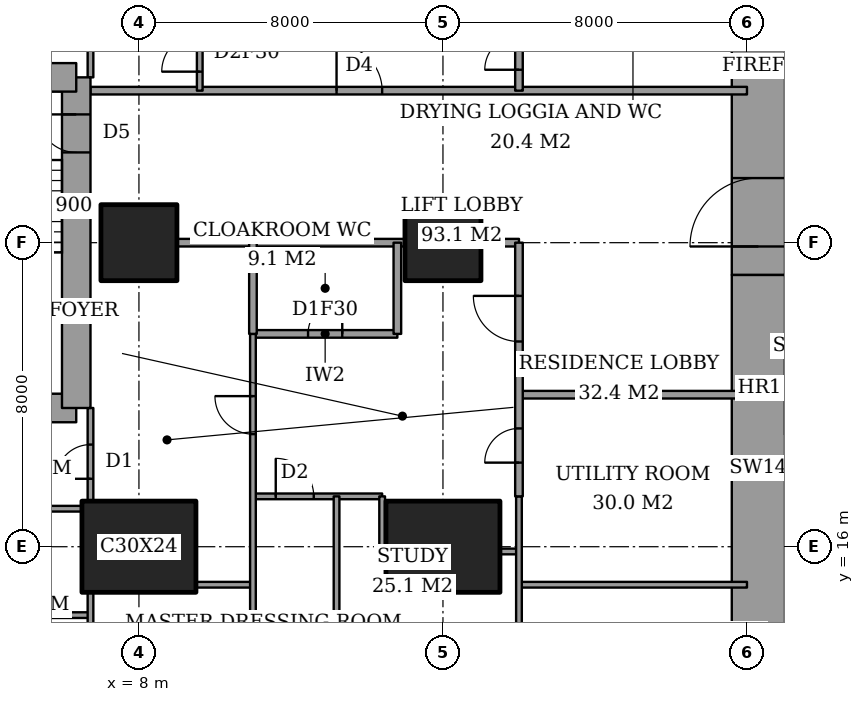
"""IFC4 building model, lengths in metres.
Left out: names, types, materials, properties, quantities, classifications, styles, units other than length and angle.
Written with IfcOpenShell. Run it as: python <this file> out.ifc"""

import sys

from ifc_helpers import new_model, si_unit, direction, frame, frame_2d, origin, origin_2d, place, context, subcontext, project, spatial, rectangle, extrude, element, fill, save


model = new_model("IFC4")
c1 = context("Model", 3, precision=1e-05, world=origin(), true_north=direction((0.0, 1.0)))
c2 = subcontext(c1, "Body", "Model", "MODEL_VIEW")
j1 = project(units=[si_unit("LENGTHUNIT", "METRE"), si_unit("PLANEANGLEUNIT", "RADIAN")], contexts=[c1])
p1 = place(None, origin())
s1 = spatial("IfcSite", under=j1, at=p1, CompositionType="ELEMENT")
p2 = place(p1, origin())
s2 = spatial("IfcBuilding", under=s1, at=p2, CompositionType="ELEMENT")
p3 = place(p2, frame((0.0, 0.0, 150.2)))
s3 = spatial("IfcBuildingStorey", under=s2, at=p3, CompositionType="ELEMENT", Elevation=150.2)
p4 = place(p3, frame((8.0, 16.0, 0.0), z_axis=(0.0, 0.0, 1.0), x_axis=(1.0, 0.0, 0.0)))
e1 = element("IfcColumn", 1, at=p4, inside=s3, PredefinedType="COLUMN", context=c2, shape_type="SweptSolid", body=[
    extrude(rectangle(XDim=3.0, YDim=2.4, at=origin_2d()), origin(), (0.0, 0.0, 1.0), 3.6),
])
p5 = place(p3, frame((8.0, 24.0, 0.0), z_axis=(0.0, 0.0, 1.0), x_axis=(1.0, 0.0, 0.0)))
e2 = element("IfcColumn", 2, at=p5, inside=s3, PredefinedType="COLUMN", context=c2, shape_type="SweptSolid", body=[
    extrude(rectangle(XDim=2.0, YDim=2.0, at=origin_2d()), origin(), (0.0, 0.0, 1.0), 3.6),
])
p6 = place(p3, frame((16.0, 16.0, 0.0), z_axis=(0.0, 0.0, 1.0), x_axis=(1.0, 0.0, 0.0)))
e3 = element("IfcColumn", 3, at=p6, inside=s3, PredefinedType="COLUMN", context=c2, shape_type="SweptSolid", body=[
    extrude(rectangle(XDim=3.0, YDim=2.4, at=origin_2d()), origin(), (0.0, 0.0, 1.0), 3.6),
])
p7 = place(p3, frame((16.0, 24.0, 0.0), z_axis=(0.0, 0.0, 1.0), x_axis=(1.0, 0.0, 0.0)))
e4 = element("IfcColumn", 4, at=p7, inside=s3, PredefinedType="COLUMN", context=c2, shape_type="SweptSolid", body=[
    extrude(rectangle(XDim=2.0, YDim=2.0, at=origin_2d()), origin(), (0.0, 0.0, 1.0), 3.6),
])
p8 = place(p3, frame((24.3, 13.0, 0.0), z_axis=(0.0, 0.0, 1.0), x_axis=(0.0, 1.0, 0.0)))
e5 = element("IfcWall", 5, at=p8, inside=s3, PredefinedType="SHEAR", context=c2, shape_type="SweptSolid", body=[
    extrude(rectangle(XDim=10.15, YDim=1.4, at=frame_2d((5.075, 0.0))), origin(), (0.0, 0.0, 1.0), 3.6),
])
p9 = place(p3, frame((24.3, 23.15, 0.0), z_axis=(0.0, 0.0, 1.0), x_axis=(0.0, 1.0, 0.0)))
e6 = element("IfcWall", 6, at=p9, inside=s3, PredefinedType="SHEAR", context=c2, shape_type="SweptSolid", body=[
    extrude(rectangle(XDim=11.85, YDim=1.4, at=frame_2d((5.925, 0.0))), origin(), (0.0, 0.0, 1.0), 3.6),
])
p10 = place(p9, frame((0.75, 0.0, 0.0)))
e7 = element("IfcOpeningElement", 7, at=p10, cuts=e6, PredefinedType="OPENING", context=c2, shape_type="SweptSolid", body=[
    extrude(rectangle(XDim=1.8, YDim=2.4, at=frame_2d((0.9, 1.2))), frame((0.0, 0.71, 0.0), z_axis=(0.0, -1.0, 0.0), x_axis=(1.0, 0.0, 0.0)), (0.0, 0.0, 1.0), 1.42),
])
p11 = place(p3, frame((1.9, 19.65, 0.0), z_axis=(0.0, 0.0, 1.0), x_axis=(1.0, 0.0, 0.0)))
e8 = element("IfcWall", 8, at=p11, inside=s3, PredefinedType="SHEAR", context=c2, shape_type="SweptSolid", body=[
    extrude(rectangle(XDim=4.45, YDim=0.75, at=frame_2d((2.225, 0.0))), origin(), (0.0, 0.0, 1.0), 3.6),
])
p12 = place(p3, frame((6.35, 19.65, 0.0), z_axis=(0.0, 0.0, 1.0), x_axis=(0.0, 1.0, 0.0)))
e9 = element("IfcWall", 9, at=p12, inside=s3, PredefinedType="SHEAR", context=c2, shape_type="SweptSolid", body=[
    extrude(rectangle(XDim=8.7, YDim=0.75, at=frame_2d((4.35, 0.0))), origin(), (0.0, 0.0, 1.0), 3.6),
])
p13 = place(p12, frame((6.725, 0.0, 0.0)))
e10 = element("IfcOpeningElement", 10, at=p13, cuts=e9, PredefinedType="OPENING", context=c2, shape_type="SweptSolid", body=[
    extrude(rectangle(XDim=1.0, YDim=2.1, at=frame_2d((0.5, 1.05))), frame((0.0, 0.385, 0.0), z_axis=(0.0, -1.0, 0.0), x_axis=(1.0, 0.0, 0.0)), (0.0, 0.0, 1.0), 0.77),
])
p14 = place(p3, frame((6.35, 28.35, 0.0), z_axis=(0.0, 0.0, 1.0), x_axis=(-1.0, 0.0, 0.0)))
e11 = element("IfcWall", 11, at=p14, inside=s3, PredefinedType="SHEAR", context=c2, shape_type="SweptSolid", body=[
    extrude(rectangle(XDim=4.45, YDim=0.75, at=frame_2d((2.225, 0.0))), origin(), (0.0, 0.0, 1.0), 3.6),
])
p15 = place(p3, frame((4.125, 14.2, 0.0), z_axis=(0.0, 0.0, 1.0), x_axis=(1.0, 0.0, 0.0)))
e12 = element("IfcWall", 12, at=p15, inside=s3, PredefinedType="PARTITIONING", context=c2, shape_type="SweptSolid", body=[
    extrude(rectangle(XDim=2.6, YDim=0.15, at=frame_2d((1.3, 0.0))), origin(), (0.0, 0.0, 1.0), 3.35),
])
p16 = place(p3, frame((9.5, 15.0, 0.0), z_axis=(0.0, 0.0, 1.0), x_axis=(1.0, 0.0, 0.0)))
e13 = element("IfcWall", 13, at=p16, inside=s3, PredefinedType="PARTITIONING", context=c2, shape_type="SweptSolid", body=[
    extrude(rectangle(XDim=1.5, YDim=0.15, at=frame_2d((0.75, 0.0))), origin(), (0.0, 0.0, 1.0), 3.35),
])
p17 = place(p3, frame((18.0, 15.0, 0.0), z_axis=(0.0, 0.0, 1.0), x_axis=(1.0, 0.0, 0.0)))
e14 = element("IfcWall", 14, at=p17, inside=s3, PredefinedType="PARTITIONING", context=c2, shape_type="SweptSolid", body=[
    extrude(rectangle(XDim=6.0, YDim=0.15, at=frame_2d((3.0, 0.0))), origin(), (0.0, 0.0, 1.0), 3.35),
])
p18 = place(p3, frame((17.5, 15.875, 0.0), z_axis=(0.0, 0.0, 1.0), x_axis=(1.0, 0.0, 0.0)))
e15 = element("IfcWall", 15, at=p18, inside=s3, PredefinedType="PARTITIONING", context=c2, shape_type="SweptSolid", body=[
    extrude(rectangle(XDim=0.5, YDim=0.15, at=frame_2d((0.25, 0.0))), origin(), (0.0, 0.0, 1.0), 2.634),
])
p19 = place(p3, frame((1.35, 17.0, 0.0), z_axis=(0.0, 0.0, 1.0), x_axis=(1.0, 0.0, 0.0)))
e16 = element("IfcWall", 16, at=p19, inside=s3, PredefinedType="PARTITIONING", context=c2, shape_type="SweptSolid", body=[
    extrude(rectangle(XDim=5.15, YDim=0.15, at=frame_2d((2.575, 0.0))), origin(), (0.0, 0.0, 1.0), 3.35),
])
p20 = place(p3, frame((11.0, 17.325, 0.0), z_axis=(0.0, 0.0, 1.0), x_axis=(1.0, 0.0, 0.0)))
e17 = element("IfcWall", 17, at=p20, inside=s3, PredefinedType="PARTITIONING", context=c2, shape_type="SweptSolid", body=[
    extrude(rectangle(XDim=3.4, YDim=0.15, at=frame_2d((1.7, 0.0))), origin(), (0.0, 0.0, 1.0), 3.35),
])
p21 = place(p20, frame((0.6, 0.0, 0.0)))
e18 = element("IfcOpeningElement", 18, at=p21, cuts=e17, PredefinedType="OPENING", context=c2, shape_type="SweptSolid", body=[
    extrude(rectangle(XDim=1.0, YDim=2.1, at=frame_2d((0.5, 1.05))), frame((0.0, 0.085, 0.0), z_axis=(0.0, -1.0, 0.0), x_axis=(1.0, 0.0, 0.0)), (0.0, 0.0, 1.0), 0.17),
])
p22 = place(p3, frame((18.0, 20.0, 0.0), z_axis=(0.0, 0.0, 1.0), x_axis=(1.0, 0.0, 0.0)))
e19 = element("IfcWall", 19, at=p22, inside=s3, PredefinedType="PARTITIONING", context=c2, shape_type="SweptSolid", body=[
    extrude(rectangle(XDim=6.0, YDim=0.2, at=frame_2d((3.0, 0.0))), origin(), (0.0, 0.0, 1.0), 3.35),
])
p23 = place(p3, frame((11.0, 21.6, 0.0), z_axis=(0.0, 0.0, 1.0), x_axis=(1.0, 0.0, 0.0)))
e20 = element("IfcWall", 20, at=p23, inside=s3, PredefinedType="PARTITIONING", context=c2, shape_type="SweptSolid", body=[
    extrude(rectangle(XDim=3.8, YDim=0.2, at=frame_2d((1.9, 0.0))), origin(), (0.0, 0.0, 1.0), 3.35),
])
p24 = place(p23, frame((1.45, 0.0, 0.0)))
e21 = element("IfcOpeningElement", 21, at=p24, cuts=e20, PredefinedType="OPENING", context=c2, shape_type="SweptSolid", body=[
    extrude(rectangle(XDim=0.9, YDim=2.1, at=frame_2d((0.45, 1.05))), frame((0.0, 0.11, 0.0), z_axis=(0.0, -1.0, 0.0), x_axis=(1.0, 0.0, 0.0)), (0.0, 0.0, 1.0), 0.22),
])
p25 = place(p3, frame((9.0, 24.0, 0.0), z_axis=(0.0, 0.0, 1.0), x_axis=(1.0, 0.0, 0.0)))
e22 = element("IfcWall", 22, at=p25, inside=s3, PredefinedType="PARTITIONING", context=c2, shape_type="SweptSolid", body=[
    extrude(rectangle(XDim=6.0, YDim=0.2, at=frame_2d((3.0, 0.0))), origin(), (0.0, 0.0, 1.0), 3.35),
])
p26 = place(p3, frame((17.0, 24.0, 0.0), z_axis=(0.0, 0.0, 1.0), x_axis=(1.0, 0.0, 0.0)))
e23 = element("IfcWall", 23, at=p26, inside=s3, PredefinedType="PARTITIONING", context=c2, shape_type="SweptSolid", body=[
    extrude(rectangle(XDim=1.0, YDim=0.2, at=frame_2d((0.5, 0.0))), origin(), (0.0, 0.0, 1.0), 3.35),
])
p27 = place(p3, frame((6.725, 28.0, 0.0), z_axis=(0.0, 0.0, 1.0), x_axis=(1.0, 0.0, 0.0)))
e24 = element("IfcWall", 24, at=p27, inside=s3, PredefinedType="PARTITIONING", context=c2, shape_type="SweptSolid", body=[
    extrude(rectangle(XDim=17.275, YDim=0.2, at=frame_2d((8.637, 0.0))), origin(), (0.0, 0.0, 1.0), 3.35),
])
p28 = place(p27, frame((6.475, 0.0, 0.0)))
e25 = element("IfcOpeningElement", 25, at=p28, cuts=e24, PredefinedType="OPENING", context=c2, shape_type="SweptSolid", body=[
    extrude(rectangle(XDim=1.2, YDim=2.4, at=frame_2d((0.6, 1.2))), frame((0.0, 0.11, 0.0), z_axis=(0.0, -1.0, 0.0), x_axis=(1.0, 0.0, 0.0)), (0.0, 0.0, 1.0), 0.22),
])
p29 = place(p3, frame((6.725, 11.0, 0.0), z_axis=(0.0, 0.0, 1.0), x_axis=(0.0, 1.0, 0.0)))
e26 = element("IfcWall", 26, at=p29, inside=s3, PredefinedType="PARTITIONING", context=c2, shape_type="SweptSolid", body=[
    extrude(rectangle(XDim=3.8, YDim=0.15, at=frame_2d((1.9, 0.0))), origin(), (0.0, 0.0, 1.0), 3.35),
])
p30 = place(p29, frame((1.15, 0.0, 0.0)))
e27 = element("IfcOpeningElement", 27, at=p30, cuts=e26, PredefinedType="OPENING", context=c2, shape_type="SweptSolid", body=[
    extrude(rectangle(XDim=0.9, YDim=2.1, at=frame_2d((0.45, 1.05))), frame((0.0, 0.085, 0.0), z_axis=(0.0, -1.0, 0.0), x_axis=(1.0, 0.0, 0.0)), (0.0, 0.0, 1.0), 0.17),
])
p31 = place(p3, frame((6.725, 17.2, 0.0), z_axis=(0.0, 0.0, 1.0), x_axis=(0.0, 1.0, 0.0)))
e28 = element("IfcWall", 28, at=p31, inside=s3, PredefinedType="PARTITIONING", context=c2, shape_type="SweptSolid", body=[
    extrude(rectangle(XDim=2.45, YDim=0.15, at=frame_2d((1.225, 0.0))), origin(), (0.0, 0.0, 1.0), 3.35),
])
p32 = place(p31, frame((0.587, 0.0, 0.0)))
e29 = element("IfcOpeningElement", 29, at=p32, cuts=e28, PredefinedType="OPENING", context=c2, shape_type="SweptSolid", body=[
    extrude(rectangle(XDim=0.9, YDim=2.1, at=frame_2d((0.45, 1.05))), frame((0.0, 0.085, 0.0), z_axis=(0.0, -1.0, 0.0), x_axis=(1.0, 0.0, 0.0)), (0.0, 0.0, 1.0), 0.17),
])
p33 = place(p3, frame((6.725, 28.35, 0.0), z_axis=(0.0, 0.0, 1.0), x_axis=(0.0, 1.0, 0.0)))
e30 = element("IfcWall", 30, at=p33, inside=s3, PredefinedType="PARTITIONING", context=c2, shape_type="SweptSolid", body=[
    extrude(rectangle(XDim=2.45, YDim=0.15, at=frame_2d((1.225, 0.0))), origin(), (0.0, 0.0, 1.0), 3.35),
])
p34 = place(p33, frame((0.913, 0.0, 0.0)))
e31 = element("IfcOpeningElement", 31, at=p34, cuts=e30, PredefinedType="OPENING", context=c2, shape_type="SweptSolid", body=[
    extrude(rectangle(XDim=1.0, YDim=2.1, at=frame_2d((0.5, 1.05))), frame((0.0, 0.085, 0.0), z_axis=(0.0, -1.0, 0.0), x_axis=(1.0, 0.0, 0.0)), (0.0, 0.0, 1.0), 0.17),
])
p35 = place(p3, frame((9.6, 28.0, 0.0), z_axis=(0.0, 0.0, 1.0), x_axis=(0.0, 1.0, 0.0)))
e32 = element("IfcWall", 32, at=p35, inside=s3, PredefinedType="PARTITIONING", context=c2, shape_type="SweptSolid", body=[
    extrude(rectangle(XDim=9.4, YDim=0.15, at=frame_2d((4.7, 0.0))), origin(), (0.0, 0.0, 1.0), 3.35),
])
p36 = place(p35, frame((0.5, 0.0, 0.0)))
e33 = element("IfcOpeningElement", 33, at=p36, cuts=e32, PredefinedType="OPENING", context=c2, shape_type="SweptSolid", body=[
    extrude(rectangle(XDim=1.0, YDim=2.1, at=frame_2d((0.5, 1.05))), frame((0.0, 0.085, 0.0), z_axis=(0.0, -1.0, 0.0), x_axis=(1.0, 0.0, 0.0)), (0.0, 0.0, 1.0), 0.17),
])
p37 = place(p3, frame((11.0, 21.6, 0.0), z_axis=(0.0, 0.0, 1.0), x_axis=(0.0, 1.0, 0.0)))
e34 = element("IfcWall", 34, at=p37, inside=s3, PredefinedType="PARTITIONING", context=c2, shape_type="SweptSolid", body=[
    extrude(rectangle(XDim=2.4, YDim=0.2, at=frame_2d((1.2, 0.0))), origin(), (0.0, 0.0, 1.0), 3.35),
])
p38 = place(p3, frame((11.0, 11.0, 0.0), z_axis=(0.0, 0.0, 1.0), x_axis=(0.0, 1.0, 0.0)))
e35 = element("IfcWall", 35, at=p38, inside=s3, PredefinedType="PARTITIONING", context=c2, shape_type="SweptSolid", body=[
    extrude(rectangle(XDim=10.6, YDim=0.15, at=frame_2d((5.3, 0.0))), origin(), (0.0, 0.0, 1.0), 3.35),
])
p39 = place(p38, frame((7.962, 0.0, 0.0)))
e36 = element("IfcOpeningElement", 36, at=p39, cuts=e35, PredefinedType="OPENING", context=c2, shape_type="SweptSolid", body=[
    extrude(rectangle(XDim=1.0, YDim=2.1, at=frame_2d((0.5, 1.05))), frame((0.0, 0.085, 0.0), z_axis=(0.0, -1.0, 0.0), x_axis=(1.0, 0.0, 0.0)), (0.0, 0.0, 1.0), 0.17),
])
p40 = place(p3, frame((13.2, 11.0, 0.0), z_axis=(0.0, 0.0, 1.0), x_axis=(0.0, 1.0, 0.0)))
e37 = element("IfcWall", 37, at=p40, inside=s3, PredefinedType="PARTITIONING", context=c2, shape_type="SweptSolid", body=[
    extrude(rectangle(XDim=6.325, YDim=0.15, at=frame_2d((3.163, 0.0))), origin(), (0.0, 0.0, 1.0), 3.35),
])
p41 = place(p3, frame((14.4, 15.875, 0.0), z_axis=(0.0, 0.0, 1.0), x_axis=(0.0, 1.0, 0.0)))
e38 = element("IfcWall", 38, at=p41, inside=s3, PredefinedType="PARTITIONING", context=c2, shape_type="SweptSolid", body=[
    extrude(rectangle(XDim=1.45, YDim=0.15, at=frame_2d((0.725, 0.0))), origin(), (0.0, 0.0, 1.0), 3.35),
])
p42 = place(p3, frame((14.8, 21.6, 0.0), z_axis=(0.0, 0.0, 1.0), x_axis=(0.0, 1.0, 0.0)))
e39 = element("IfcWall", 39, at=p42, inside=s3, PredefinedType="PARTITIONING", context=c2, shape_type="SweptSolid", body=[
    extrude(rectangle(XDim=2.4, YDim=0.2, at=frame_2d((1.2, 0.0))), origin(), (0.0, 0.0, 1.0), 3.35),
])
p43 = place(p3, frame((18.0, 17.325, 0.0), z_axis=(0.0, 0.0, 1.0), x_axis=(0.0, 1.0, 0.0)))
e40 = element("IfcWall", 40, at=p43, inside=s3, PredefinedType="PARTITIONING", context=c2, shape_type="SweptSolid", body=[
    extrude(rectangle(XDim=6.675, YDim=0.2, at=frame_2d((3.337, 0.0))), origin(), (0.0, 0.0, 1.0), 3.35),
])
p44 = place(p43, frame((4.075, 0.0, 0.0)))
e41 = element("IfcOpeningElement", 41, at=p44, cuts=e40, PredefinedType="OPENING", context=c2, shape_type="SweptSolid", body=[
    extrude(rectangle(XDim=1.2, YDim=2.4, at=frame_2d((0.6, 1.2))), frame((0.0, 0.11, 0.0), z_axis=(0.0, -1.0, 0.0), x_axis=(1.0, 0.0, 0.0)), (0.0, 0.0, 1.0), 0.22),
])
p45 = place(p43, frame((0.887, 0.0, 0.0)))
e42 = element("IfcOpeningElement", 42, at=p45, cuts=e40, PredefinedType="OPENING", context=c2, shape_type="SweptSolid", body=[
    extrude(rectangle(XDim=0.9, YDim=2.1, at=frame_2d((0.45, 1.05))), frame((0.0, 0.11, 0.0), z_axis=(0.0, -1.0, 0.0), x_axis=(1.0, 0.0, 0.0)), (0.0, 0.0, 1.0), 0.22),
])
p46 = place(p3, frame((18.0, 28.0, 0.0), z_axis=(0.0, 0.0, 1.0), x_axis=(0.0, 1.0, 0.0)))
e43 = element("IfcWall", 43, at=p46, inside=s3, PredefinedType="PARTITIONING", context=c2, shape_type="SweptSolid", body=[
    extrude(rectangle(XDim=3.4, YDim=0.2, at=frame_2d((1.7, 0.0))), origin(), (0.0, 0.0, 1.0), 3.35),
])
p47 = place(p46, frame((0.55, 0.0, 0.0)))
e44 = element("IfcOpeningElement", 44, at=p47, cuts=e43, PredefinedType="OPENING", context=c2, shape_type="SweptSolid", body=[
    extrude(rectangle(XDim=0.9, YDim=2.1, at=frame_2d((0.45, 1.05))), frame((0.0, 0.11, 0.0), z_axis=(0.0, -1.0, 0.0), x_axis=(1.0, 0.0, 0.0)), (0.0, 0.0, 1.0), 0.22),
])
p48 = place(p3, frame((18.0, 11.0, 0.0), z_axis=(0.0, 0.0, 1.0), x_axis=(0.0, 1.0, 0.0)))
e45 = element("IfcWall", 45, at=p48, inside=s3, PredefinedType="PARTITIONING", context=c2, shape_type="SweptSolid", body=[
    extrude(rectangle(XDim=6.325, YDim=0.15, at=frame_2d((3.163, 0.0))), origin(), (0.0, 0.0, 1.0), 3.35),
])
p49 = place(p32, origin())
e46 = element("IfcDoor", 46, at=p49, inside=s3, OperationType="SINGLE_SWING_RIGHT", PredefinedType="DOOR", context=c2, shape_type="SweptSolid", body=[
    extrude(rectangle(XDim=0.9, YDim=2.1, at=frame_2d((0.45, 1.05))), frame((0.0, 0.025, 0.0), z_axis=(0.0, -1.0, 0.0), x_axis=(1.0, 0.0, 0.0)), (0.0, 0.0, 1.0), 0.05),
])
fill(e29, e46)
p50 = place(p39, origin())
e47 = element("IfcDoor", 47, at=p50, inside=s3, OperationType="SINGLE_SWING_LEFT", PredefinedType="DOOR", context=c2, shape_type="SweptSolid", body=[
    extrude(rectangle(XDim=1.0, YDim=2.1, at=frame_2d((0.5, 1.05))), frame((0.0, 0.025, 0.0), z_axis=(0.0, -1.0, 0.0), x_axis=(1.0, 0.0, 0.0)), (0.0, 0.0, 1.0), 0.05),
])
fill(e36, e47)
p51 = place(p24, origin())
e48 = element("IfcDoor", 48, at=p51, inside=s3, OperationType="SINGLE_SWING_LEFT", PredefinedType="DOOR", context=c2, shape_type="SweptSolid", body=[
    extrude(rectangle(XDim=0.9, YDim=2.1, at=frame_2d((0.45, 1.05))), frame((0.0, 0.025, 0.0), z_axis=(0.0, -1.0, 0.0), x_axis=(1.0, 0.0, 0.0)), (0.0, 0.0, 1.0), 0.05),
])
fill(e21, e48)
p52 = place(p44, origin())
e49 = element("IfcDoor", 49, at=p52, inside=s3, OperationType="SINGLE_SWING_LEFT", PredefinedType="DOOR", context=c2, shape_type="SweptSolid", body=[
    extrude(rectangle(XDim=1.2, YDim=2.4, at=frame_2d((0.6, 1.2))), frame((0.0, 0.025, 0.0), z_axis=(0.0, -1.0, 0.0), x_axis=(1.0, 0.0, 0.0)), (0.0, 0.0, 1.0), 0.05),
])
fill(e41, e49)
p53 = place(p21, origin())
e50 = element("IfcDoor", 50, at=p53, inside=s3, OperationType="SINGLE_SWING_RIGHT", PredefinedType="DOOR", context=c2, shape_type="SweptSolid", body=[
    extrude(rectangle(XDim=1.0, YDim=2.1, at=frame_2d((0.5, 1.05))), frame((0.0, 0.025, 0.0), z_axis=(0.0, -1.0, 0.0), x_axis=(1.0, 0.0, 0.0)), (0.0, 0.0, 1.0), 0.05),
])
fill(e18, e50)
p54 = place(p45, origin())
e51 = element("IfcDoor", 51, at=p54, inside=s3, OperationType="SINGLE_SWING_RIGHT", PredefinedType="DOOR", context=c2, shape_type="SweptSolid", body=[
    extrude(rectangle(XDim=0.9, YDim=2.1, at=frame_2d((0.45, 1.05))), frame((0.0, 0.025, 0.0), z_axis=(0.0, -1.0, 0.0), x_axis=(1.0, 0.0, 0.0)), (0.0, 0.0, 1.0), 0.05),
])
fill(e42, e51)
p55 = place(p36, origin())
e52 = element("IfcDoor", 52, at=p55, inside=s3, OperationType="SINGLE_SWING_RIGHT", PredefinedType="DOOR", context=c2, shape_type="SweptSolid", body=[
    extrude(rectangle(XDim=1.0, YDim=2.1, at=frame_2d((0.5, 1.05))), frame((0.0, 0.025, 0.0), z_axis=(0.0, -1.0, 0.0), x_axis=(1.0, 0.0, 0.0)), (0.0, 0.0, 1.0), 0.05),
])
fill(e33, e52)
p56 = place(p28, origin())
e53 = element("IfcDoor", 53, at=p56, inside=s3, OperationType="SINGLE_SWING_RIGHT", PredefinedType="DOOR", context=c2, shape_type="SweptSolid", body=[
    extrude(rectangle(XDim=1.2, YDim=2.4, at=frame_2d((0.6, 1.2))), frame((0.0, 0.025, 0.0), z_axis=(0.0, -1.0, 0.0), x_axis=(1.0, 0.0, 0.0)), (0.0, 0.0, 1.0), 0.05),
])
fill(e25, e53)
p57 = place(p47, origin())
e54 = element("IfcDoor", 54, at=p57, inside=s3, OperationType="SINGLE_SWING_RIGHT", PredefinedType="DOOR", context=c2, shape_type="SweptSolid", body=[
    extrude(rectangle(XDim=0.9, YDim=2.1, at=frame_2d((0.45, 1.05))), frame((0.0, 0.025, 0.0), z_axis=(0.0, -1.0, 0.0), x_axis=(1.0, 0.0, 0.0)), (0.0, 0.0, 1.0), 0.05),
])
fill(e44, e54)
p58 = place(p10, origin())
e55 = element("IfcDoor", 55, at=p58, inside=s3, OperationType="DOUBLE_DOOR_DOUBLE_SWING", PredefinedType="DOOR", context=c2, shape_type="SweptSolid", body=[
    extrude(rectangle(XDim=1.8, YDim=2.4, at=frame_2d((0.9, 1.2))), frame((0.0, 0.025, 0.0), z_axis=(0.0, -1.0, 0.0), x_axis=(1.0, 0.0, 0.0)), (0.0, 0.0, 1.0), 0.05),
])
fill(e7, e55)
p59 = place(p13, origin())
e56 = element("IfcDoor", 56, at=p59, inside=s3, OperationType="SINGLE_SWING_LEFT", PredefinedType="DOOR", context=c2, shape_type="SweptSolid", body=[
    extrude(rectangle(XDim=1.0, YDim=2.1, at=frame_2d((0.5, 1.05))), frame((0.0, 0.025, 0.0), z_axis=(0.0, -1.0, 0.0), x_axis=(1.0, 0.0, 0.0)), (0.0, 0.0, 1.0), 0.05),
])
fill(e10, e56)
save(model, sys.argv[1])
